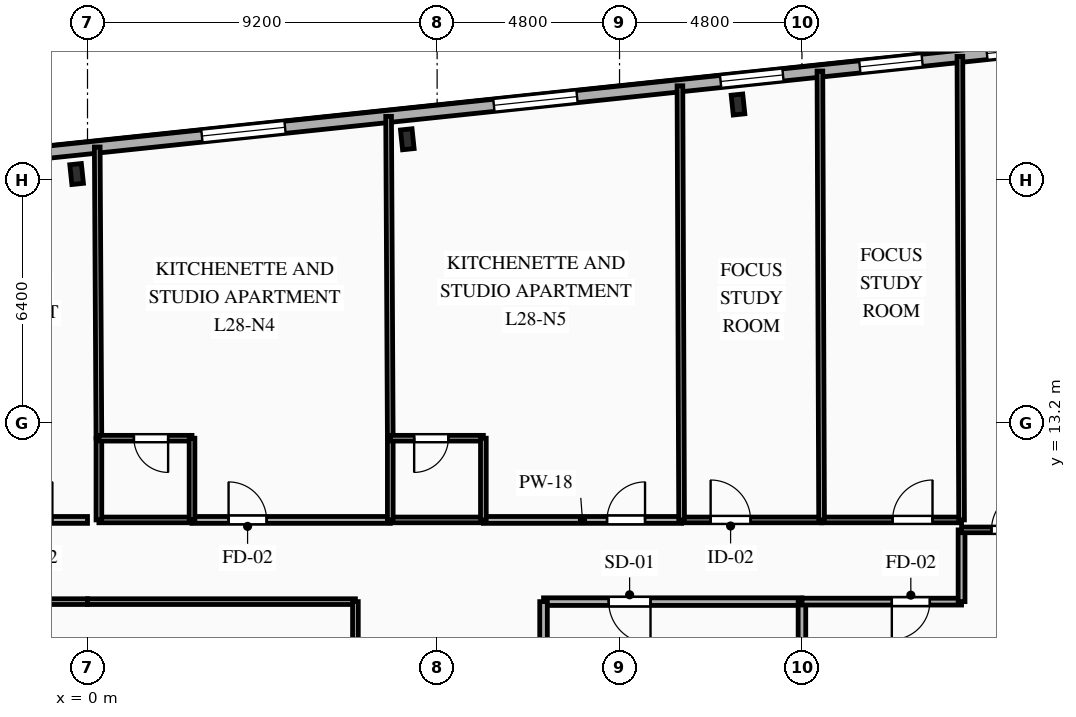
"""IFC4 building model, lengths in metres.
Left out: names, types, materials, properties, quantities, classifications, styles, units other than length and angle.
Written with IfcOpenShell. Run it as: python <this file> out.ifc"""

import sys

from ifc_helpers import new_model, si_unit, direction, frame, frame_2d, origin, origin_2d, place, context, subcontext, project, spatial, rectangle, i_section, extrude, element, fill, save


model = new_model("IFC4")
c1 = context("Model", 3, precision=1e-05, world=origin(), true_north=direction((0.0, 1.0)))
c2 = subcontext(c1, "Body", "Model", "MODEL_VIEW")
j1 = project(units=[si_unit("LENGTHUNIT", "METRE"), si_unit("PLANEANGLEUNIT", "RADIAN")], contexts=[c1])
p1 = place(None, origin())
s1 = spatial("IfcSite", under=j1, at=p1, CompositionType="ELEMENT")
p2 = place(p1, origin())
s2 = spatial("IfcBuilding", under=s1, at=p2, CompositionType="ELEMENT")
p3 = place(p2, frame((0.0, 0.0, 102.45)))
s3 = spatial("IfcBuildingStorey", under=s2, at=p3, CompositionType="ELEMENT", Elevation=102.45)
for number, where, z_axis, x_axis in (
    (1, (17.117, 21.58, 0.0), (0.0, 0.0, 1.0), (0.995, 0.105, 0.0)),
    (2, (8.415, 20.666, 0.0), (0.0, 0.0, 1.0), (0.995, 0.105, 0.0)),
    (3, (-0.287, 19.751, 0.0), (0.0, 0.0, 1.0), (0.995, 0.105, 0.0)),
):
    element("IfcColumn", number, at=place(p3, frame(where, z_axis=z_axis, x_axis=x_axis)), inside=s3, PredefinedType="COLUMN", context=c2, shape_type="SweptSolid", body=[
        extrude(i_section(OverallWidth=0.306, OverallDepth=0.524, WebThickness=0.021, FlangeThickness=0.04, FilletRadius=0.027, at=origin_2d()), origin(), (0.0, 0.0, 1.0), 3.35),
    ])
p4 = place(p3, frame((-27.107, 17.586, 0.0), z_axis=(0.0, 0.0, 1.0), x_axis=(0.994521628355, 0.104531003701, 0.0)))
e4 = element("IfcWall", 4, at=p4, inside=s3, PredefinedType="SOLIDWALL", context=c2, shape_type="SweptSolid", body=[
    extrude(rectangle(XDim=53.8, YDim=0.32, at=frame_2d((26.9, 0.0))), origin(), (0.0, 0.0, 1.0), 3.045),
])
p5 = place(p4, frame((7.261, 0.0, 0.85)))
e5 = element("IfcOpeningElement", 5, at=p5, cuts=e4, PredefinedType="OPENING", context=c2, shape_type="SweptSolid", body=[
    extrude(rectangle(XDim=1.65, YDim=1.85, at=frame_2d((0.825, 0.925))), frame((0.0, 0.17, 0.0), z_axis=(0.0, -1.0, 0.0), x_axis=(1.0, 0.0, 0.0)), (0.0, 0.0, 1.0), 0.34),
])
p6 = place(p4, frame((16.423, 0.0, 0.85)))
e6 = element("IfcOpeningElement", 6, at=p6, cuts=e4, PredefinedType="OPENING", context=c2, shape_type="SweptSolid", body=[
    extrude(rectangle(XDim=1.5, YDim=1.85, at=frame_2d((0.75, 0.925))), frame((0.0, 0.17, 0.0), z_axis=(0.0, -1.0, 0.0), x_axis=(1.0, 0.0, 0.0)), (0.0, 0.0, 1.0), 0.34),
])
p7 = place(p4, frame((22.598, 0.0, 0.85)))
e7 = element("IfcOpeningElement", 7, at=p7, cuts=e4, PredefinedType="OPENING", context=c2, shape_type="SweptSolid", body=[
    extrude(rectangle(XDim=2.2, YDim=1.85, at=frame_2d((1.1, 0.925))), frame((0.0, 0.17, 0.0), z_axis=(0.0, -1.0, 0.0), x_axis=(1.0, 0.0, 0.0)), (0.0, 0.0, 1.0), 0.34),
])
p8 = place(p4, frame((30.283, 0.0, 0.85)))
e8 = element("IfcOpeningElement", 8, at=p8, cuts=e4, PredefinedType="OPENING", context=c2, shape_type="SweptSolid", body=[
    extrude(rectangle(XDim=2.2, YDim=1.85, at=frame_2d((1.1, 0.925))), frame((0.0, 0.17, 0.0), z_axis=(0.0, -1.0, 0.0), x_axis=(1.0, 0.0, 0.0)), (0.0, 0.0, 1.0), 0.34),
])
p9 = place(p4, frame((38.009, 0.0, 0.85)))
e9 = element("IfcOpeningElement", 9, at=p9, cuts=e4, PredefinedType="OPENING", context=c2, shape_type="SweptSolid", body=[
    extrude(rectangle(XDim=2.2, YDim=1.85, at=frame_2d((1.1, 0.925))), frame((0.0, 0.17, 0.0), z_axis=(0.0, -1.0, 0.0), x_axis=(1.0, 0.0, 0.0)), (0.0, 0.0, 1.0), 0.34),
])
p10 = place(p4, frame((44.008, 0.0, 0.85)))
e10 = element("IfcOpeningElement", 10, at=p10, cuts=e4, PredefinedType="OPENING", context=c2, shape_type="SweptSolid", body=[
    extrude(rectangle(XDim=1.65, YDim=1.85, at=frame_2d((0.825, 0.925))), frame((0.0, 0.17, 0.0), z_axis=(0.0, -1.0, 0.0), x_axis=(1.0, 0.0, 0.0)), (0.0, 0.0, 1.0), 0.34),
])
p11 = place(p4, frame((47.691, 0.0, 0.85)))
e11 = element("IfcOpeningElement", 11, at=p11, cuts=e4, PredefinedType="OPENING", context=c2, shape_type="SweptSolid", body=[
    extrude(rectangle(XDim=1.65, YDim=1.85, at=frame_2d((0.825, 0.925))), frame((0.0, 0.17, 0.0), z_axis=(0.0, -1.0, 0.0), x_axis=(1.0, 0.0, 0.0)), (0.0, 0.0, 1.0), 0.34),
])
p12 = place(p4, frame((51.054, 0.0, 0.85)))
e12 = element("IfcOpeningElement", 12, at=p12, cuts=e4, PredefinedType="OPENING", context=c2, shape_type="SweptSolid", body=[
    extrude(rectangle(XDim=1.65, YDim=1.85, at=frame_2d((0.825, 0.925))), frame((0.0, 0.17, 0.0), z_axis=(0.0, -1.0, 0.0), x_axis=(1.0, 0.0, 0.0)), (0.0, 0.0, 1.0), 0.34),
])
p13 = place(p3, frame((18.8, 8.5, 0.0), z_axis=(0.0, 0.0, 1.0), x_axis=(-1.0, 0.0, 0.0)))
e13 = element("IfcWall", 13, at=p13, inside=s3, PredefinedType="PARTITIONING", context=c2, shape_type="SweptSolid", body=[
    extrude(rectangle(XDim=6.8, YDim=0.2, at=frame_2d((3.4, 0.0))), origin(), (0.0, 0.0, 1.0), 3.045),
])
p14 = place(p13, frame((3.985, 0.0, 0.0)))
e14 = element("IfcOpeningElement", 14, at=p14, cuts=e13, PredefinedType="OPENING", context=c2, shape_type="SweptSolid", body=[
    extrude(rectangle(XDim=1.1, YDim=2.15, at=frame_2d((0.55, 1.075))), frame((0.0, 0.11, 0.0), z_axis=(0.0, -1.0, 0.0), x_axis=(1.0, 0.0, 0.0)), (0.0, 0.0, 1.0), 0.22),
])
p15 = place(p3, frame((12.0, 8.5, 0.0), z_axis=(0.0, 0.0, 1.0), x_axis=(0.0, -1.0, 0.0)))
e15 = element("IfcWall", 15, at=p15, inside=s3, PredefinedType="PARTITIONING", context=c2, shape_type="SweptSolid", body=[
    extrude(rectangle(XDim=2.9, YDim=0.2, at=frame_2d((1.45, 0.0))), origin(), (0.0, 0.0, 1.0), 3.045),
])
p16 = place(p3, frame((18.8, 5.6, 0.0), z_axis=(0.0, 0.0, 1.0), x_axis=(0.0, 1.0, 0.0)))
e16 = element("IfcWall", 16, at=p16, inside=s3, PredefinedType="PARTITIONING", context=c2, shape_type="SweptSolid", body=[
    extrude(rectangle(XDim=2.9, YDim=0.2, at=frame_2d((1.45, 0.0))), origin(), (0.0, 0.0, 1.0), 2.53),
])
p17 = place(p3, frame((-4.917, 10.65, 0.0), z_axis=(0.0, 0.0, 1.0), x_axis=(1.0, 0.0, 0.0)))
e17 = element("IfcWall", 17, at=p17, inside=s3, PredefinedType="PARTITIONING", context=c2, shape_type="SweptSolid", body=[
    extrude(rectangle(XDim=4.917, YDim=0.18, at=frame_2d((2.458, 0.0))), origin(), (0.0, 0.0, 1.0), 3.045),
])
p18 = place(p17, frame((2.992, 0.0, 0.0)))
e18 = element("IfcOpeningElement", 18, at=p18, cuts=e17, PredefinedType="OPENING", context=c2, shape_type="SweptSolid", body=[
    extrude(rectangle(XDim=1.0, YDim=2.15, at=frame_2d((0.5, 1.075))), frame((0.0, 0.1, 0.0), z_axis=(0.0, -1.0, 0.0), x_axis=(1.0, 0.0, 0.0)), (0.0, 0.0, 1.0), 0.2),
])
p19 = place(p3, frame((0.0, 8.5, 0.0), z_axis=(0.0, 0.0, 1.0), x_axis=(-1.0, 0.0, 0.0)))
e19 = element("IfcWall", 19, at=p19, inside=s3, PredefinedType="PARTITIONING", context=c2, shape_type="SweptSolid", body=[
    extrude(rectangle(XDim=7.05, YDim=0.15, at=frame_2d((3.525, 0.0))), origin(), (0.0, 0.0, 1.0), 3.045),
])
p20 = place(p19, frame((1.185, 0.0, 0.0)))
e20 = element("IfcOpeningElement", 20, at=p20, cuts=e19, PredefinedType="OPENING", context=c2, shape_type="SweptSolid", body=[
    extrude(rectangle(XDim=1.05, YDim=2.15, at=frame_2d((0.525, 1.075))), frame((0.0, 0.085, 0.0), z_axis=(0.0, -1.0, 0.0), x_axis=(1.0, 0.0, 0.0)), (0.0, 0.0, 1.0), 0.17),
])
p21 = place(p3, frame((23.0, 8.5, 0.0), z_axis=(0.0, 0.0, 1.0), x_axis=(-1.0, 0.0, 0.0)))
e21 = element("IfcWall", 21, at=p21, inside=s3, PredefinedType="PARTITIONING", context=c2, shape_type="SweptSolid", body=[
    extrude(rectangle(XDim=4.2, YDim=0.18, at=frame_2d((2.1, 0.0))), origin(), (0.0, 0.0, 1.0), 3.045),
])
p22 = place(p21, frame((0.835, 0.0, 0.0)))
e22 = element("IfcOpeningElement", 22, at=p22, cuts=e21, PredefinedType="OPENING", context=c2, shape_type="SweptSolid", body=[
    extrude(rectangle(XDim=1.0, YDim=2.15, at=frame_2d((0.5, 1.075))), frame((0.0, 0.1, 0.0), z_axis=(0.0, -1.0, 0.0), x_axis=(1.0, 0.0, 0.0)), (0.0, 0.0, 1.0), 0.2),
])
p23 = place(p3, frame((23.0, 10.388, 0.0), z_axis=(0.0, 0.0, 1.0), x_axis=(0.0, -1.0, 0.0)))
e23 = element("IfcWall", 23, at=p23, inside=s3, PredefinedType="PARTITIONING", context=c2, shape_type="SweptSolid", body=[
    extrude(rectangle(XDim=1.888, YDim=0.18, at=frame_2d((0.944, 0.0))), origin(), (0.0, 0.0, 1.0), 3.045),
])
p24 = place(p3, frame((2.75, 10.65, 0.0), z_axis=(0.0, 0.0, 1.0), x_axis=(1.0, 0.0, 0.0)))
e24 = element("IfcWall", 24, at=p24, inside=s3, PredefinedType="PARTITIONING", context=c2, shape_type="SweptSolid", body=[
    extrude(rectangle(XDim=5.217, YDim=0.18, at=frame_2d((2.608, 0.0))), origin(), (0.0, 0.0, 1.0), 3.045),
])
p25 = place(p24, frame((0.962, 0.0, 0.0)))
e25 = element("IfcOpeningElement", 25, at=p25, cuts=e24, PredefinedType="OPENING", context=c2, shape_type="SweptSolid", body=[
    extrude(rectangle(XDim=1.0, YDim=2.15, at=frame_2d((0.5, 1.075))), frame((0.0, 0.1, 0.0), z_axis=(0.0, -1.0, 0.0), x_axis=(1.0, 0.0, 0.0)), (0.0, 0.0, 1.0), 0.2),
])
p26 = place(p3, frame((0.3, 10.65, 0.0), z_axis=(0.0, 0.0, 1.0), x_axis=(1.0, 0.0, 0.0)))
e26 = element("IfcWall", 26, at=p26, inside=s3, PredefinedType="PLUMBINGWALL", context=c2, shape_type="SweptSolid", body=[
    extrude(rectangle(XDim=2.45, YDim=0.15, at=frame_2d((1.225, 0.0))), origin(), (0.0, 0.0, 1.0), 3.045),
])
p27 = place(p3, frame((10.417, 10.65, 0.0), z_axis=(0.0, 0.0, 1.0), x_axis=(1.0, 0.0, 0.0)))
e27 = element("IfcWall", 27, at=p27, inside=s3, PredefinedType="PARTITIONING", context=c2, shape_type="SweptSolid", body=[
    extrude(rectangle(XDim=5.216, YDim=0.18, at=frame_2d((2.608, 0.0))), origin(), (0.0, 0.0, 1.0), 3.045),
])
p28 = place(p27, frame((3.254, 0.0, 0.0)))
e28 = element("IfcOpeningElement", 28, at=p28, cuts=e27, PredefinedType="OPENING", context=c2, shape_type="SweptSolid", body=[
    extrude(rectangle(XDim=1.0, YDim=2.15, at=frame_2d((0.5, 1.075))), frame((0.0, 0.1, 0.0), z_axis=(0.0, -1.0, 0.0), x_axis=(1.0, 0.0, 0.0)), (0.0, 0.0, 1.0), 0.2),
])
p29 = place(p3, frame((7.967, 10.65, 0.0), z_axis=(0.0, 0.0, 1.0), x_axis=(1.0, 0.0, 0.0)))
e29 = element("IfcWall", 29, at=p29, inside=s3, PredefinedType="PLUMBINGWALL", context=c2, shape_type="SweptSolid", body=[
    extrude(rectangle(XDim=2.45, YDim=0.15, at=frame_2d((1.225, 0.0))), origin(), (0.0, 0.0, 1.0), 3.045),
])
p30 = place(p3, frame((15.633, 10.65, 0.0), z_axis=(0.0, 0.0, 1.0), x_axis=(1.0, 0.0, 0.0)))
e30 = element("IfcWall", 30, at=p30, inside=s3, PredefinedType="PARTITIONING", context=c2, shape_type="SweptSolid", body=[
    extrude(rectangle(XDim=3.683, YDim=0.15, at=frame_2d((1.842, 0.0))), origin(), (0.0, 0.0, 1.0), 3.045),
])
p31 = place(p30, frame((0.764, 0.0, 0.0)))
e31 = element("IfcOpeningElement", 31, at=p31, cuts=e30, PredefinedType="OPENING", context=c2, shape_type="SweptSolid", body=[
    extrude(rectangle(XDim=1.05, YDim=2.15, at=frame_2d((0.525, 1.075))), frame((0.0, 0.085, 0.0), z_axis=(0.0, -1.0, 0.0), x_axis=(1.0, 0.0, 0.0)), (0.0, 0.0, 1.0), 0.17),
])
p32 = place(p3, frame((19.316, 10.65, 0.0), z_axis=(0.0, 0.0, 1.0), x_axis=(1.0, 0.0, 0.0)))
e32 = element("IfcWall", 32, at=p32, inside=s3, PredefinedType="PARTITIONING", context=c2, shape_type="SweptSolid", body=[
    extrude(rectangle(XDim=3.684, YDim=0.15, at=frame_2d((1.842, 0.0))), origin(), (0.0, 0.0, 1.0), 3.045),
])
p33 = place(p32, frame((1.869, 0.0, 0.0)))
e33 = element("IfcOpeningElement", 33, at=p33, cuts=e32, PredefinedType="OPENING", context=c2, shape_type="SweptSolid", body=[
    extrude(rectangle(XDim=1.05, YDim=2.15, at=frame_2d((0.525, 1.075))), frame((0.0, 0.085, 0.0), z_axis=(0.0, -1.0, 0.0), x_axis=(1.0, 0.0, 0.0)), (0.0, 0.0, 1.0), 0.17),
])
for number, where, z_axis, x_axis in (
    (34, (7.05, 8.5, 0.0), (0.0, 0.0, 1.0), (-1.0, 0.0, 0.0)),
    (35, (7.05, 1.45, 0.0), (0.0, 0.0, 1.0), (0.0, 1.0, 0.0)),
):
    element("IfcWall", number, at=place(p3, frame(where, z_axis=z_axis, x_axis=x_axis)), inside=s3, PredefinedType="PARTITIONING", context=c2, shape_type="SweptSolid", body=[
        extrude(rectangle(XDim=7.05, YDim=0.15, at=frame_2d((3.525, 0.0))), origin(), (0.0, 0.0, 1.0), 3.045),
    ])
p34 = place(p3, frame((23.0, 10.388, 0.0), z_axis=(0.0, 0.0, 1.0), x_axis=(1.0, 0.0, 0.0)))
e36 = element("IfcWall", 36, at=p34, inside=s3, PredefinedType="PARTITIONING", context=c2, shape_type="SweptSolid", body=[
    extrude(rectangle(XDim=3.871, YDim=0.15, at=frame_2d((1.936, 0.0))), origin(), (0.0, 0.0, 1.0), 3.045),
])
p35 = place(p34, frame((0.788, 0.0, 0.0)))
e37 = element("IfcOpeningElement", 37, at=p35, cuts=e36, PredefinedType="OPENING", context=c2, shape_type="SweptSolid", body=[
    extrude(rectangle(XDim=1.05, YDim=2.15, at=frame_2d((0.525, 1.075))), frame((0.0, 0.085, 0.0), z_axis=(0.0, -1.0, 0.0), x_axis=(1.0, 0.0, 0.0)), (0.0, 0.0, 1.0), 0.17),
])
p36 = place(p3, frame((23.0, 10.65, 0.0), z_axis=(0.0, 0.0, 1.0), x_axis=(-0.0036027147, 0.999993510202, 0.0)))
e38 = element("IfcWall", 38, at=p36, inside=s3, PredefinedType="PARTITIONING", context=c2, shape_type="SweptSolid", body=[
    extrude(rectangle(XDim=12.198, YDim=0.15, at=frame_2d((6.099, 0.0))), origin(), (0.0, 0.0, 1.0), 3.045),
])
p37 = place(p3, frame((0.256, 20.462, 0.0), z_axis=(0.0, 0.0, 1.0), x_axis=(0.00573567775, -0.999983550865, 0.0)))
e39 = element("IfcWall", 39, at=p37, inside=s3, PredefinedType="PARTITIONING", context=c2, shape_type="SweptSolid", body=[
    extrude(rectangle(XDim=7.662, YDim=0.15, at=frame_2d((3.831, 0.0))), origin(), (0.0, 0.0, 1.0), 3.045),
])
p38 = place(p3, frame((0.3, 12.8, 0.0), z_axis=(0.0, 0.0, 1.0), x_axis=(0.0, -1.0, 0.0)))
e40 = element("IfcWall", 40, at=p38, inside=s3, PredefinedType="PLUMBINGWALL", context=c2, shape_type="SweptSolid", body=[
    extrude(rectangle(XDim=2.15, YDim=0.15, at=frame_2d((1.075, 0.0))), origin(), (0.0, 0.0, 1.0), 3.045),
])
p39 = place(p3, frame((2.75, 12.8, 0.0), z_axis=(0.0, 0.0, 1.0), x_axis=(-1.0, 0.0, 0.0)))
e41 = element("IfcWall", 41, at=p39, inside=s3, PredefinedType="PLUMBINGWALL", context=c2, shape_type="SweptSolid", body=[
    extrude(rectangle(XDim=2.45, YDim=0.15, at=frame_2d((1.225, 0.0))), origin(), (0.0, 0.0, 1.0), 3.045),
])
p40 = place(p39, frame((0.629, 0.0, 0.0)))
e42 = element("IfcOpeningElement", 42, at=p40, cuts=e41, PredefinedType="OPENING", context=c2, shape_type="SweptSolid", body=[
    extrude(rectangle(XDim=0.9, YDim=2.1, at=frame_2d((0.45, 1.05))), frame((0.0, 0.085, 0.0), z_axis=(0.0, -1.0, 0.0), x_axis=(1.0, 0.0, 0.0)), (0.0, 0.0, 1.0), 0.17),
])
p41 = place(p3, frame((2.75, 10.65, 0.0), z_axis=(0.0, 0.0, 1.0), x_axis=(0.0, 1.0, 0.0)))
e43 = element("IfcWall", 43, at=p41, inside=s3, PredefinedType="PLUMBINGWALL", context=c2, shape_type="SweptSolid", body=[
    extrude(rectangle(XDim=2.15, YDim=0.15, at=frame_2d((1.075, 0.0))), origin(), (0.0, 0.0, 1.0), 3.045),
])
p42 = place(p3, frame((7.923, 21.268, 0.0), z_axis=(0.0, 0.0, 1.0), x_axis=(0.005189792576, -0.999986532936, 0.0)))
e44 = element("IfcWall", 44, at=p42, inside=s3, PredefinedType="PARTITIONING", context=c2, shape_type="SweptSolid", body=[
    extrude(rectangle(XDim=8.468, YDim=0.15, at=frame_2d((4.234, 0.0))), origin(), (0.0, 0.0, 1.0), 3.045),
])
p43 = place(p3, frame((7.967, 12.8, 0.0), z_axis=(0.0, 0.0, 1.0), x_axis=(0.0, -1.0, 0.0)))
e45 = element("IfcWall", 45, at=p43, inside=s3, PredefinedType="PLUMBINGWALL", context=c2, shape_type="SweptSolid", body=[
    extrude(rectangle(XDim=2.15, YDim=0.15, at=frame_2d((1.075, 0.0))), origin(), (0.0, 0.0, 1.0), 3.045),
])
p44 = place(p3, frame((10.417, 12.8, 0.0), z_axis=(0.0, 0.0, 1.0), x_axis=(-1.0, 0.0, 0.0)))
e46 = element("IfcWall", 46, at=p44, inside=s3, PredefinedType="PLUMBINGWALL", context=c2, shape_type="SweptSolid", body=[
    extrude(rectangle(XDim=2.45, YDim=0.15, at=frame_2d((1.225, 0.0))), origin(), (0.0, 0.0, 1.0), 3.045),
])
p45 = place(p44, frame((0.921, 0.0, 0.0)))
e47 = element("IfcOpeningElement", 47, at=p45, cuts=e46, PredefinedType="OPENING", context=c2, shape_type="SweptSolid", body=[
    extrude(rectangle(XDim=0.9, YDim=2.1, at=frame_2d((0.45, 1.05))), frame((0.0, 0.085, 0.0), z_axis=(0.0, -1.0, 0.0), x_axis=(1.0, 0.0, 0.0)), (0.0, 0.0, 1.0), 0.17),
])
p46 = place(p3, frame((10.417, 10.65, 0.0), z_axis=(0.0, 0.0, 1.0), x_axis=(0.0, 1.0, 0.0)))
e48 = element("IfcWall", 48, at=p46, inside=s3, PredefinedType="PLUMBINGWALL", context=c2, shape_type="SweptSolid", body=[
    extrude(rectangle(XDim=2.15, YDim=0.15, at=frame_2d((1.075, 0.0))), origin(), (0.0, 0.0, 1.0), 3.045),
])
p47 = place(p3, frame((15.589, 22.073, 0.0), z_axis=(0.0, 0.0, 1.0), x_axis=(0.003846947384, -0.999992600471, 0.0)))
e49 = element("IfcWall", 49, at=p47, inside=s3, PredefinedType="PARTITIONING", context=c2, shape_type="SweptSolid", body=[
    extrude(rectangle(XDim=11.423, YDim=0.15, at=frame_2d((5.712, 0.0))), origin(), (0.0, 0.0, 1.0), 3.045),
])
p48 = place(p3, frame((19.273, 22.46, 0.0), z_axis=(0.0, 0.0, 1.0), x_axis=(0.003700156578, -0.999993154397, 0.0)))
e50 = element("IfcWall", 50, at=p48, inside=s3, PredefinedType="PARTITIONING", context=c2, shape_type="SweptSolid", body=[
    extrude(rectangle(XDim=11.811, YDim=0.15, at=frame_2d((5.905, 0.0))), origin(), (0.0, 0.0, 1.0), 3.045),
])
p49 = place(p8, origin())
e51 = element("IfcWindow", 51, at=p49, inside=s3, PartitioningType="SINGLE_PANEL", PredefinedType="WINDOW", context=c2, shape_type="SweptSolid", body=[
    extrude(rectangle(XDim=2.2, YDim=1.85, at=frame_2d((1.1, 0.925))), frame((0.0, 0.03, 0.0), z_axis=(0.0, -1.0, 0.0), x_axis=(1.0, 0.0, 0.0)), (0.0, 0.0, 1.0), 0.06),
])
fill(e8, e51)
p50 = place(p9, origin())
e52 = element("IfcWindow", 52, at=p50, inside=s3, PartitioningType="SINGLE_PANEL", PredefinedType="WINDOW", context=c2, shape_type="SweptSolid", body=[
    extrude(rectangle(XDim=2.2, YDim=1.85, at=frame_2d((1.1, 0.925))), frame((0.0, 0.03, 0.0), z_axis=(0.0, -1.0, 0.0), x_axis=(1.0, 0.0, 0.0)), (0.0, 0.0, 1.0), 0.06),
])
fill(e9, e52)
p51 = place(p10, origin())
e53 = element("IfcWindow", 53, at=p51, inside=s3, PartitioningType="SINGLE_PANEL", PredefinedType="WINDOW", context=c2, shape_type="SweptSolid", body=[
    extrude(rectangle(XDim=1.65, YDim=1.85, at=frame_2d((0.825, 0.925))), frame((0.0, 0.03, 0.0), z_axis=(0.0, -1.0, 0.0), x_axis=(1.0, 0.0, 0.0)), (0.0, 0.0, 1.0), 0.06),
])
fill(e10, e53)
p52 = place(p11, origin())
e54 = element("IfcWindow", 54, at=p52, inside=s3, PartitioningType="SINGLE_PANEL", PredefinedType="WINDOW", context=c2, shape_type="SweptSolid", body=[
    extrude(rectangle(XDim=1.65, YDim=1.85, at=frame_2d((0.825, 0.925))), frame((0.0, 0.03, 0.0), z_axis=(0.0, -1.0, 0.0), x_axis=(1.0, 0.0, 0.0)), (0.0, 0.0, 1.0), 0.06),
])
fill(e11, e54)
p53 = place(p12, origin())
e55 = element("IfcWindow", 55, at=p53, inside=s3, PartitioningType="SINGLE_PANEL", PredefinedType="WINDOW", context=c2, shape_type="SweptSolid", body=[
    extrude(rectangle(XDim=1.65, YDim=1.85, at=frame_2d((0.825, 0.925))), frame((0.0, 0.03, 0.0), z_axis=(0.0, -1.0, 0.0), x_axis=(1.0, 0.0, 0.0)), (0.0, 0.0, 1.0), 0.06),
])
fill(e12, e55)
p54 = place(p14, origin())
e56 = element("IfcDoor", 56, at=p54, inside=s3, OperationType="SINGLE_SWING_LEFT", PredefinedType="DOOR", context=c2, shape_type="SweptSolid", body=[
    extrude(rectangle(XDim=1.1, YDim=2.15, at=frame_2d((0.55, 1.075))), frame((0.0, 0.025, 0.0), z_axis=(0.0, -1.0, 0.0), x_axis=(1.0, 0.0, 0.0)), (0.0, 0.0, 1.0), 0.05),
])
fill(e14, e56)
p55 = place(p18, origin())
e57 = element("IfcDoor", 57, at=p55, inside=s3, OperationType="SINGLE_SWING_RIGHT", PredefinedType="DOOR", context=c2, shape_type="SweptSolid", body=[
    extrude(rectangle(XDim=1.0, YDim=2.15, at=frame_2d((0.5, 1.075))), frame((0.0, 0.025, 0.0), z_axis=(0.0, -1.0, 0.0), x_axis=(1.0, 0.0, 0.0)), (0.0, 0.0, 1.0), 0.05),
])
fill(e18, e57)
p56 = place(p22, origin())
e58 = element("IfcDoor", 58, at=p56, inside=s3, OperationType="SINGLE_SWING_RIGHT", PredefinedType="DOOR", context=c2, shape_type="SweptSolid", body=[
    extrude(rectangle(XDim=1.0, YDim=2.15, at=frame_2d((0.5, 1.075))), frame((0.0, 0.025, 0.0), z_axis=(0.0, -1.0, 0.0), x_axis=(1.0, 0.0, 0.0)), (0.0, 0.0, 1.0), 0.05),
])
fill(e22, e58)
p57 = place(p25, origin())
e59 = element("IfcDoor", 59, at=p57, inside=s3, OperationType="SINGLE_SWING_LEFT", PredefinedType="DOOR", context=c2, shape_type="SweptSolid", body=[
    extrude(rectangle(XDim=1.0, YDim=2.15, at=frame_2d((0.5, 1.075))), frame((0.0, 0.025, 0.0), z_axis=(0.0, -1.0, 0.0), x_axis=(1.0, 0.0, 0.0)), (0.0, 0.0, 1.0), 0.05),
])
fill(e25, e59)
p58 = place(p28, origin())
e60 = element("IfcDoor", 60, at=p58, inside=s3, OperationType="SINGLE_SWING_RIGHT", PredefinedType="DOOR", context=c2, shape_type="SweptSolid", body=[
    extrude(rectangle(XDim=1.0, YDim=2.15, at=frame_2d((0.5, 1.075))), frame((0.0, 0.025, 0.0), z_axis=(0.0, -1.0, 0.0), x_axis=(1.0, 0.0, 0.0)), (0.0, 0.0, 1.0), 0.05),
])
fill(e28, e60)
p59 = place(p31, origin())
e61 = element("IfcDoor", 61, at=p59, inside=s3, OperationType="SINGLE_SWING_LEFT", PredefinedType="DOOR", context=c2, shape_type="SweptSolid", body=[
    extrude(rectangle(XDim=1.05, YDim=2.15, at=frame_2d((0.525, 1.075))), frame((0.0, 0.025, 0.0), z_axis=(0.0, -1.0, 0.0), x_axis=(1.0, 0.0, 0.0)), (0.0, 0.0, 1.0), 0.05),
])
fill(e31, e61)
p60 = place(p33, origin())
e62 = element("IfcDoor", 62, at=p60, inside=s3, OperationType="SINGLE_SWING_RIGHT", PredefinedType="DOOR", context=c2, shape_type="SweptSolid", body=[
    extrude(rectangle(XDim=1.05, YDim=2.15, at=frame_2d((0.525, 1.075))), frame((0.0, 0.025, 0.0), z_axis=(0.0, -1.0, 0.0), x_axis=(1.0, 0.0, 0.0)), (0.0, 0.0, 1.0), 0.05),
])
fill(e33, e62)
p61 = place(p35, origin())
e63 = element("IfcDoor", 63, at=p61, inside=s3, OperationType="SINGLE_SWING_RIGHT", PredefinedType="DOOR", context=c2, shape_type="SweptSolid", body=[
    extrude(rectangle(XDim=1.05, YDim=2.15, at=frame_2d((0.525, 1.075))), frame((0.0, 0.025, 0.0), z_axis=(0.0, -1.0, 0.0), x_axis=(1.0, 0.0, 0.0)), (0.0, 0.0, 1.0), 0.05),
])
fill(e37, e63)
p62 = place(p40, origin())
e64 = element("IfcDoor", 64, at=p62, inside=s3, OperationType="SINGLE_SWING_LEFT", PredefinedType="DOOR", context=c2, shape_type="SweptSolid", body=[
    extrude(rectangle(XDim=0.9, YDim=2.1, at=frame_2d((0.45, 1.05))), frame((0.0, 0.025, 0.0), z_axis=(0.0, -1.0, 0.0), x_axis=(1.0, 0.0, 0.0)), (0.0, 0.0, 1.0), 0.05),
])
fill(e42, e64)
p63 = place(p45, origin())
e65 = element("IfcDoor", 65, at=p63, inside=s3, OperationType="SINGLE_SWING_RIGHT", PredefinedType="DOOR", context=c2, shape_type="SweptSolid", body=[
    extrude(rectangle(XDim=0.9, YDim=2.1, at=frame_2d((0.45, 1.05))), frame((0.0, 0.025, 0.0), z_axis=(0.0, -1.0, 0.0), x_axis=(1.0, 0.0, 0.0)), (0.0, 0.0, 1.0), 0.05),
])
fill(e47, e65)
save(model, sys.argv[1])
